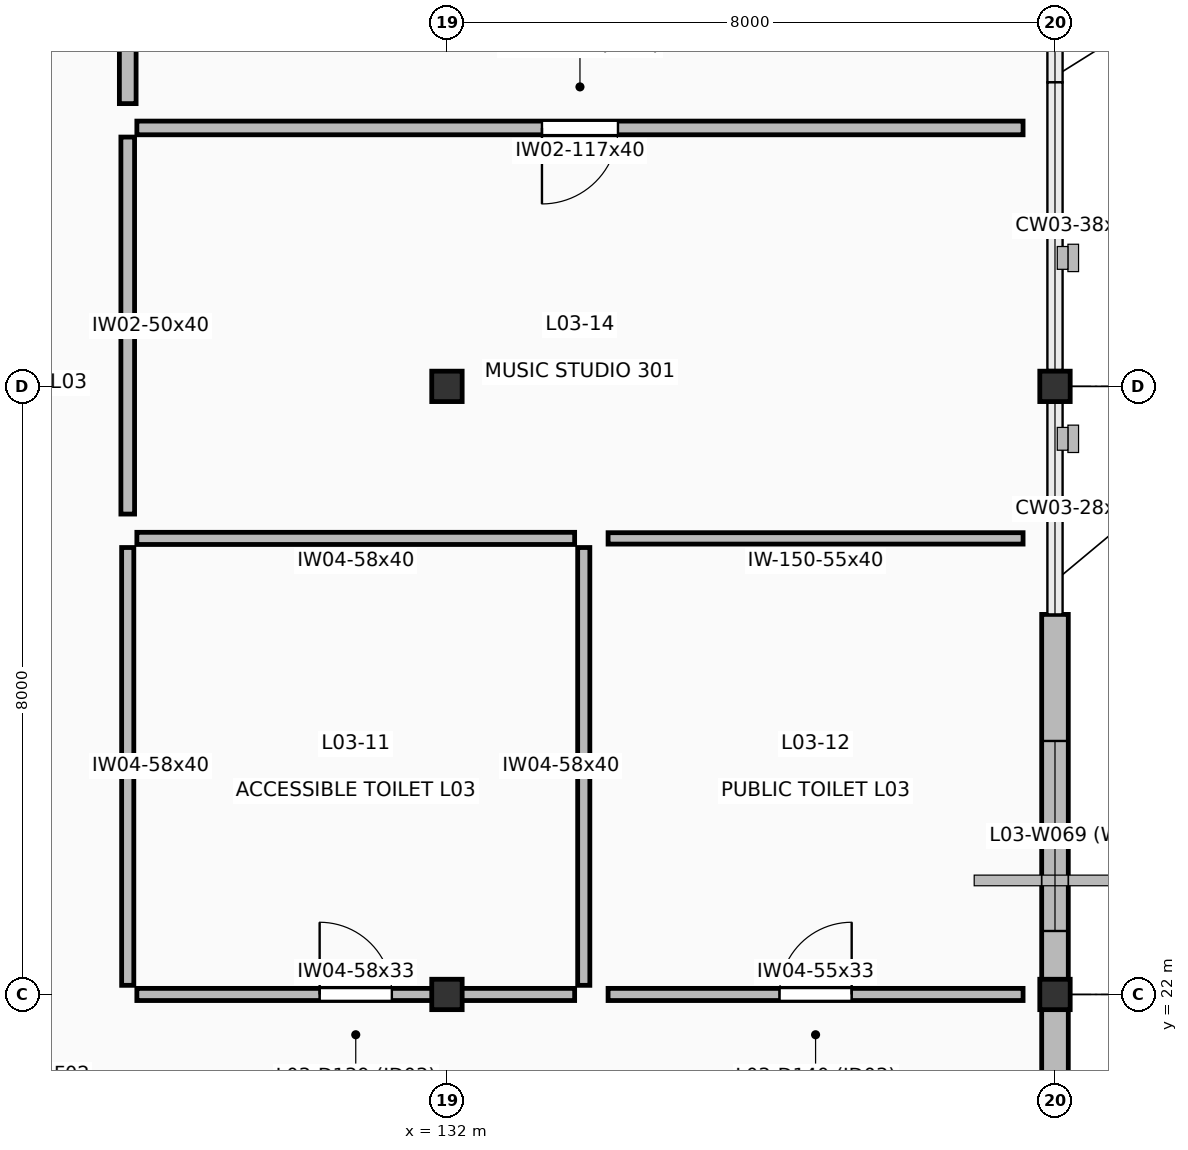
"""IFC4 building model, lengths in metres.
Left out: names, types, materials, properties, quantities, classifications, styles, units other than length and angle.
Written with IfcOpenShell. Run it as: python <this file> out.ifc"""

import sys

from ifc_helpers import new_model, si_unit, direction, frame, frame_2d, origin, origin_2d, place, context, subcontext, project, spatial, rectangle, extrude, element, fill, save


model = new_model("IFC4")
c1 = context("Model", 3, precision=1e-05, world=origin(), true_north=direction((0.0, 1.0)))
c2 = subcontext(c1, "Body", "Model", "MODEL_VIEW")
j1 = project(units=[si_unit("LENGTHUNIT", "METRE"), si_unit("PLANEANGLEUNIT", "RADIAN")], contexts=[c1])
p1 = place(None, origin())
s1 = spatial("IfcSite", under=j1, at=p1, CompositionType="ELEMENT")
p2 = place(p1, origin())
s2 = spatial("IfcBuilding", under=s1, at=p2, CompositionType="ELEMENT")
p3 = place(p2, frame((0.0, 0.0, 13.8)))
s3 = spatial("IfcBuildingStorey", under=s2, at=p3, CompositionType="ELEMENT", Elevation=13.8)
for number, where, z_axis, x_axis in (
    (1, (132.0, 22.0, 0.0), (0.0, 0.0, 1.0), (1.0, 0.0, 0.0)),
    (2, (132.0, 30.0, 0.0), (0.0, 0.0, 1.0), (1.0, 0.0, 0.0)),
    (3, (140.0, 22.0, 0.0), (0.0, 0.0, 1.0), (1.0, 0.0, 0.0)),
    (4, (140.0, 30.0, 0.0), (0.0, 0.0, 1.0), (1.0, 0.0, 0.0)),
):
    element("IfcColumn", number, at=place(p3, frame(where, z_axis=z_axis, x_axis=x_axis)), inside=s3, PredefinedType="COLUMN", context=c2, shape_type="SweptSolid", body=[
        extrude(rectangle(XDim=0.4, YDim=0.4, at=origin_2d()), origin(), (0.0, 0.0, 1.0), 4.2),
    ])
p4 = place(p3, frame((140.0, 27.0, 0.0), z_axis=(0.0, 0.0, 1.0), x_axis=(0.0, -1.0, 0.0)))
e5 = element("IfcWall", 5, at=p4, inside=s3, PredefinedType="SOLIDWALL", context=c2, shape_type="SweptSolid", body=[
    extrude(rectangle(XDim=7.0, YDim=0.35, at=frame_2d((3.5, 0.0))), origin(), (0.0, 0.0, 1.0), 3.325),
])
p5 = place(p4, frame((1.665, 0.0, 1.6)))
e6 = element("IfcOpeningElement", 6, at=p5, cuts=e5, PredefinedType="OPENING", context=c2, shape_type="SweptSolid", body=[
    extrude(rectangle(XDim=2.5, YDim=1.3, at=frame_2d((1.25, 0.65))), frame((0.0, 0.185, 0.0), z_axis=(0.0, -1.0, 0.0), x_axis=(1.0, 0.0, 0.0)), (0.0, 0.0, 1.0), 0.37),
])
p6 = place(p3, frame((127.92, 22.0, 0.0), z_axis=(0.0, 0.0, 1.0), x_axis=(1.0, 0.0, 0.0)))
e7 = element("IfcWall", 7, at=p6, inside=s3, PredefinedType="PLUMBINGWALL", context=c2, shape_type="SweptSolid", body=[
    extrude(rectangle(XDim=5.76, YDim=0.16, at=frame_2d((2.88, 0.0))), origin(), (0.0, 0.0, 1.0), 3.265),
])
p7 = place(p6, frame((2.405, 0.0, 0.0)))
e8 = element("IfcOpeningElement", 8, at=p7, cuts=e7, PredefinedType="OPENING", context=c2, shape_type="SweptSolid", body=[
    extrude(rectangle(XDim=0.95, YDim=2.15, at=frame_2d((0.475, 1.075))), frame((0.0, 0.09, 0.0), z_axis=(0.0, -1.0, 0.0), x_axis=(1.0, 0.0, 0.0)), (0.0, 0.0, 1.0), 0.18),
])
p8 = place(p3, frame((133.68, 28.0, 0.0), z_axis=(0.0, 0.0, 1.0), x_axis=(-1.0, 0.0, 0.0)))
e9 = element("IfcWall", 9, at=p8, inside=s3, PredefinedType="PLUMBINGWALL", context=c2, shape_type="SweptSolid", body=[
    extrude(rectangle(XDim=5.76, YDim=0.16, at=frame_2d((2.88, 0.0))), origin(), (0.0, 0.0, 1.0), 3.98),
])
for number, where, z_axis, x_axis in (
    (10, (127.8, 27.88, 0.0), (0.0, 0.0, 1.0), (0.0, -1.0, 0.0)),
    (11, (133.8, 22.12, 0.0), (0.0, 0.0, 1.0), (0.0, 1.0, 0.0)),
):
    element("IfcWall", number, at=place(p3, frame(where, z_axis=z_axis, x_axis=x_axis)), inside=s3, PredefinedType="PLUMBINGWALL", context=c2, shape_type="SweptSolid", body=[
        extrude(rectangle(XDim=5.76, YDim=0.16, at=frame_2d((2.88, 0.0))), origin(), (0.0, 0.0, 1.0), 3.98),
    ])
p9 = place(p3, frame((134.12, 22.0, 0.0), z_axis=(0.0, 0.0, 1.0), x_axis=(1.0, 0.0, 0.0)))
e12 = element("IfcWall", 12, at=p9, inside=s3, PredefinedType="PLUMBINGWALL", context=c2, shape_type="SweptSolid", body=[
    extrude(rectangle(XDim=5.46, YDim=0.16, at=frame_2d((2.73, 0.0))), origin(), (0.0, 0.0, 1.0), 3.265),
])
p10 = place(p9, frame((2.255, 0.0, 0.0)))
e13 = element("IfcOpeningElement", 13, at=p10, cuts=e12, PredefinedType="OPENING", context=c2, shape_type="SweptSolid", body=[
    extrude(rectangle(XDim=0.95, YDim=2.15, at=frame_2d((0.475, 1.075))), frame((0.0, 0.09, 0.0), z_axis=(0.0, -1.0, 0.0), x_axis=(1.0, 0.0, 0.0)), (0.0, 0.0, 1.0), 0.18),
])
p11 = place(p3, frame((139.58, 28.0, 0.0), z_axis=(0.0, 0.0, 1.0), x_axis=(-1.0, 0.0, 0.0)))
e14 = element("IfcWall", 14, at=p11, inside=s3, PredefinedType="PARTITIONING", context=c2, shape_type="SweptSolid", body=[
    extrude(rectangle(XDim=5.46, YDim=0.15, at=frame_2d((2.73, 0.0))), origin(), (0.0, 0.0, 1.0), 3.98),
])
p12 = place(p3, frame((139.58, 33.4, 0.0), z_axis=(0.0, 0.0, 1.0), x_axis=(-1.0, 0.0, 0.0)))
e15 = element("IfcWall", 15, at=p12, inside=s3, PredefinedType="PARTITIONING", context=c2, shape_type="SweptSolid", body=[
    extrude(rectangle(XDim=11.66, YDim=0.18, at=frame_2d((5.83, 0.0))), origin(), (0.0, 0.0, 1.0), 3.98),
])
p13 = place(p12, frame((5.33, 0.0, 0.0)))
e16 = element("IfcOpeningElement", 16, at=p13, cuts=e15, PredefinedType="OPENING", context=c2, shape_type="SweptSolid", body=[
    extrude(rectangle(XDim=1.0, YDim=2.15, at=frame_2d((0.5, 1.075))), frame((0.0, 0.1, 0.0), z_axis=(0.0, -1.0, 0.0), x_axis=(1.0, 0.0, 0.0)), (0.0, 0.0, 1.0), 0.2),
])
p14 = place(p3, frame((127.8, 33.28, 0.0), z_axis=(0.0, 0.0, 1.0), x_axis=(0.0, -1.0, 0.0)))
e17 = element("IfcWall", 17, at=p14, inside=s3, PredefinedType="PARTITIONING", context=c2, shape_type="SweptSolid", body=[
    extrude(rectangle(XDim=4.96, YDim=0.18, at=frame_2d((2.48, 0.0))), origin(), (0.0, 0.0, 1.0), 3.98),
])
p15 = place(p3, frame((127.8, 37.88, 0.0), z_axis=(0.0, 0.0, 1.0), x_axis=(0.0, -1.0, 0.0)))
e18 = element("IfcWall", 18, at=p15, inside=s3, PredefinedType="SOLIDWALL", context=c2, shape_type="SweptSolid", body=[
    extrude(rectangle(XDim=4.16, YDim=0.22, at=frame_2d((2.08, 0.0))), origin(), (0.0, 0.0, 1.0), 3.98),
])
p16 = place(p5, origin())
e19 = element("IfcWindow", 19, at=p16, inside=s3, PartitioningType="DOUBLE_PANEL_VERTICAL", PredefinedType="WINDOW", context=c2, shape_type="SweptSolid", body=[
    extrude(rectangle(XDim=2.5, YDim=1.3, at=frame_2d((1.25, 0.65))), frame((0.0, 0.03, 0.0), z_axis=(0.0, -1.0, 0.0), x_axis=(1.0, 0.0, 0.0)), (0.0, 0.0, 1.0), 0.06),
])
fill(e6, e19)
p17 = place(p7, origin())
e20 = element("IfcDoor", 20, at=p17, inside=s3, OperationType="SINGLE_SWING_LEFT", PredefinedType="DOOR", context=c2, shape_type="SweptSolid", body=[
    extrude(rectangle(XDim=0.95, YDim=2.15, at=frame_2d((0.475, 1.075))), frame((0.0, 0.025, 0.0), z_axis=(0.0, -1.0, 0.0), x_axis=(1.0, 0.0, 0.0)), (0.0, 0.0, 1.0), 0.05),
])
fill(e8, e20)
p18 = place(p10, origin())
e21 = element("IfcDoor", 21, at=p18, inside=s3, OperationType="SINGLE_SWING_RIGHT", PredefinedType="DOOR", context=c2, shape_type="SweptSolid", body=[
    extrude(rectangle(XDim=0.95, YDim=2.15, at=frame_2d((0.475, 1.075))), frame((0.0, 0.025, 0.0), z_axis=(0.0, -1.0, 0.0), x_axis=(1.0, 0.0, 0.0)), (0.0, 0.0, 1.0), 0.05),
])
fill(e13, e21)
p19 = place(p13, origin())
e22 = element("IfcDoor", 22, at=p19, inside=s3, OperationType="SINGLE_SWING_RIGHT", PredefinedType="DOOR", context=c2, shape_type="SweptSolid", body=[
    extrude(rectangle(XDim=1.0, YDim=2.15, at=frame_2d((0.5, 1.075))), frame((0.0, 0.025, 0.0), z_axis=(0.0, -1.0, 0.0), x_axis=(1.0, 0.0, 0.0)), (0.0, 0.0, 1.0), 0.05),
])
fill(e16, e22)
save(model, sys.argv[1])
